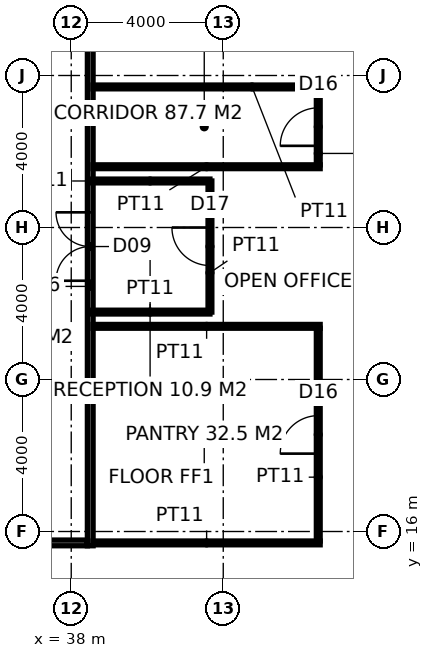
"""IFC4 building model, lengths in metres.
Left out: names, types, materials, properties, quantities, classifications, styles, units other than length and angle.
Written with IfcOpenShell. Run it as: python <this file> out.ifc"""

import sys

from ifc_helpers import new_model, si_unit, direction, frame, frame_2d, origin, place, context, subcontext, project, spatial, rectangle, extrude, element, fill, save


model = new_model("IFC4")
c1 = context("Model", 3, precision=1e-05, world=origin(), true_north=direction((0.0, 1.0)))
c2 = subcontext(c1, "Body", "Model", "MODEL_VIEW")
j1 = project(units=[si_unit("LENGTHUNIT", "METRE"), si_unit("PLANEANGLEUNIT", "RADIAN")], contexts=[c1])
p1 = place(None, origin())
s1 = spatial("IfcSite", under=j1, at=p1, CompositionType="ELEMENT")
p2 = place(p1, origin())
s2 = spatial("IfcBuilding", under=s1, at=p2, CompositionType="ELEMENT")
p3 = place(p2, frame((0.0, 0.0, 234.2)))
s3 = spatial("IfcBuildingStorey", under=s2, at=p3, CompositionType="ELEMENT", Elevation=234.2)
p4 = place(p3, frame((38.5, 15.625, 0.0), z_axis=(0.0, 0.0, 1.0), x_axis=(0.0, 1.0, 0.0)))
e1 = element("IfcWall", 1, at=p4, inside=s3, PredefinedType="PARTITIONING", context=c2, shape_type="SweptSolid", body=[
    extrude(rectangle(XDim=22.75, YDim=0.15, at=frame_2d((11.375, 0.0))), origin(), (0.0, 0.0, 1.0), 2.65),
])
p5 = place(p4, frame((6.974, 0.0, 0.0)))
e2 = element("IfcOpeningElement", 2, at=p5, cuts=e1, PredefinedType="OPENING", context=c2, shape_type="SweptSolid", body=[
    extrude(rectangle(XDim=1.8, YDim=2.4, at=frame_2d((0.9, 1.2))), frame((0.0, 0.085, 0.0), z_axis=(0.0, -1.0, 0.0), x_axis=(1.0, 0.0, 0.0)), (0.0, 0.0, 1.0), 0.17),
])
p6 = place(p4, frame((18.226, 0.0, 0.0)))
e3 = element("IfcOpeningElement", 3, at=p6, cuts=e1, PredefinedType="OPENING", context=c2, shape_type="SweptSolid", body=[
    extrude(rectangle(XDim=1.8, YDim=2.4, at=frame_2d((0.9, 1.2))), frame((0.0, 0.085, 0.0), z_axis=(0.0, -1.0, 0.0), x_axis=(1.0, 0.0, 0.0)), (0.0, 0.0, 1.0), 0.17),
])
p7 = place(p3, frame((15.775, 15.7, 0.0), z_axis=(0.0, 0.0, 1.0), x_axis=(1.0, 0.0, 0.0)))
e4 = element("IfcWall", 4, at=p7, inside=s3, PredefinedType="PARTITIONING", context=c2, shape_type="SweptSolid", body=[
    extrude(rectangle(XDim=22.65, YDim=0.15, at=frame_2d((11.325, 0.0))), origin(), (0.0, 0.0, 1.0), 3.85),
])
for number, where, z_axis, x_axis in (
    (5, (38.575, 15.7, 0.0), (0.0, 0.0, 1.0), (1.0, 0.0, 0.0)),
    (6, (38.575, 21.399, 0.0), (0.0, 0.0, 1.0), (1.0, 0.0, 0.0)),
    (7, (38.575, 25.599, 0.0), (0.0, 0.0, 1.0), (1.0, 0.0, 0.0)),
):
    element("IfcWall", number, at=place(p3, frame(where, z_axis=z_axis, x_axis=x_axis)), inside=s3, PredefinedType="PARTITIONING", context=c2, shape_type="SweptSolid", body=[
        extrude(rectangle(XDim=5.975, YDim=0.1, at=frame_2d((2.988, 0.0))), origin(), (0.0, 0.0, 1.0), 3.85),
    ])
p8 = place(p3, frame((38.575, 27.699, 0.0), z_axis=(0.0, 0.0, 1.0), x_axis=(1.0, 0.0, 0.0)))
e8 = element("IfcWall", 8, at=p8, inside=s3, PredefinedType="PARTITIONING", context=c2, shape_type="SweptSolid", body=[
    extrude(rectangle(XDim=5.975, YDim=0.1, at=frame_2d((2.988, 0.0))), origin(), (0.0, 0.0, 1.0), 2.65),
])
p9 = place(p3, frame((44.5, 15.75, 0.0), z_axis=(0.0, 0.0, 1.0), x_axis=(0.0, 1.0, 0.0)))
e9 = element("IfcWall", 9, at=p9, inside=s3, PredefinedType="PARTITIONING", context=c2, shape_type="SweptSolid", body=[
    extrude(rectangle(XDim=5.599, YDim=0.1, at=frame_2d((2.8, 0.0))), origin(), (0.0, 0.0, 1.0), 3.85),
])
p10 = place(p9, frame((2.3, 0.0, 0.0)))
e10 = element("IfcOpeningElement", 10, at=p10, cuts=e9, PredefinedType="OPENING", context=c2, shape_type="SweptSolid", body=[
    extrude(rectangle(XDim=1.0, YDim=2.2, at=frame_2d((0.5, 1.1))), frame((0.0, 0.06, 0.0), z_axis=(0.0, -1.0, 0.0), x_axis=(1.0, 0.0, 0.0)), (0.0, 0.0, 1.0), 0.12),
])
p11 = place(p3, frame((44.5, 25.649, 0.0), z_axis=(0.0, 0.0, 1.0), x_axis=(0.0, 1.0, 0.0)))
e11 = element("IfcWall", 11, at=p11, inside=s3, PredefinedType="PARTITIONING", context=c2, shape_type="SweptSolid", body=[
    extrude(rectangle(XDim=2.0, YDim=0.1, at=frame_2d((1.0, 0.0))), origin(), (0.0, 0.0, 1.0), 3.85),
])
p12 = place(p11, frame((0.5, 0.0, 0.0)))
e12 = element("IfcOpeningElement", 12, at=p12, cuts=e11, PredefinedType="OPENING", context=c2, shape_type="SweptSolid", body=[
    extrude(rectangle(XDim=1.0, YDim=2.2, at=frame_2d((0.5, 1.1))), frame((0.0, 0.06, 0.0), z_axis=(0.0, -1.0, 0.0), x_axis=(1.0, 0.0, 0.0)), (0.0, 0.0, 1.0), 0.12),
])
p13 = place(p3, frame((38.5, 21.774, 0.0), z_axis=(0.0, 0.0, 1.0), x_axis=(1.0, 0.0, 0.0)))
e13 = element("IfcWall", 13, at=p13, inside=s3, PredefinedType="PARTITIONING", context=c2, shape_type="SweptSolid", body=[
    extrude(rectangle(XDim=3.15, YDim=0.1, at=frame_2d((1.575, 0.0))), origin(), (0.0, 0.0, 1.0), 3.85),
])
p14 = place(p3, frame((41.65, 21.774, 0.0), z_axis=(0.0, 0.0, 1.0), x_axis=(0.0, 1.0, 0.0)))
e14 = element("IfcWall", 14, at=p14, inside=s3, PredefinedType="PARTITIONING", context=c2, shape_type="SweptSolid", body=[
    extrude(rectangle(XDim=3.45, YDim=0.1, at=frame_2d((1.725, 0.0))), origin(), (0.0, 0.0, 1.0), 3.85),
])
p15 = place(p14, frame((1.225, 0.0, 0.0)))
e15 = element("IfcOpeningElement", 15, at=p15, cuts=e14, PredefinedType="OPENING", context=c2, shape_type="SweptSolid", body=[
    extrude(rectangle(XDim=1.0, YDim=2.2, at=frame_2d((0.5, 1.1))), frame((0.0, 0.06, 0.0), z_axis=(0.0, -1.0, 0.0), x_axis=(1.0, 0.0, 0.0)), (0.0, 0.0, 1.0), 0.12),
])
p16 = place(p3, frame((41.65, 25.224, 0.0), z_axis=(0.0, 0.0, 1.0), x_axis=(-1.0, 0.0, 0.0)))
e16 = element("IfcWall", 16, at=p16, inside=s3, PredefinedType="PARTITIONING", context=c2, shape_type="SweptSolid", body=[
    extrude(rectangle(XDim=3.15, YDim=0.1, at=frame_2d((1.575, 0.0))), origin(), (0.0, 0.0, 1.0), 3.85),
])
p17 = place(p5, origin())
e17 = element("IfcDoor", 17, at=p17, inside=s3, OperationType="DOUBLE_DOOR_DOUBLE_SWING", PredefinedType="DOOR", context=c2, shape_type="SweptSolid", body=[
    extrude(rectangle(XDim=1.8, YDim=2.4, at=frame_2d((0.9, 1.2))), frame((0.0, 0.025, 0.0), z_axis=(0.0, -1.0, 0.0), x_axis=(1.0, 0.0, 0.0)), (0.0, 0.0, 1.0), 0.05),
])
fill(e2, e17)
p18 = place(p10, origin())
e18 = element("IfcDoor", 18, at=p18, inside=s3, OperationType="SINGLE_SWING_LEFT", PredefinedType="DOOR", context=c2, shape_type="SweptSolid", body=[
    extrude(rectangle(XDim=1.0, YDim=2.2, at=frame_2d((0.5, 1.1))), frame((0.0, 0.025, 0.0), z_axis=(0.0, -1.0, 0.0), x_axis=(1.0, 0.0, 0.0)), (0.0, 0.0, 1.0), 0.05),
])
fill(e10, e18)
p19 = place(p12, origin())
e19 = element("IfcDoor", 19, at=p19, inside=s3, OperationType="SINGLE_SWING_LEFT", PredefinedType="DOOR", context=c2, shape_type="SweptSolid", body=[
    extrude(rectangle(XDim=1.0, YDim=2.2, at=frame_2d((0.5, 1.1))), frame((0.0, 0.025, 0.0), z_axis=(0.0, -1.0, 0.0), x_axis=(1.0, 0.0, 0.0)), (0.0, 0.0, 1.0), 0.05),
])
fill(e12, e19)
p20 = place(p15, origin())
e20 = element("IfcDoor", 20, at=p20, inside=s3, OperationType="SINGLE_SWING_RIGHT", PredefinedType="DOOR", context=c2, shape_type="SweptSolid", body=[
    extrude(rectangle(XDim=1.0, YDim=2.2, at=frame_2d((0.5, 1.1))), frame((0.0, 0.025, 0.0), z_axis=(0.0, -1.0, 0.0), x_axis=(1.0, 0.0, 0.0)), (0.0, 0.0, 1.0), 0.05),
])
fill(e15, e20)
save(model, sys.argv[1])
